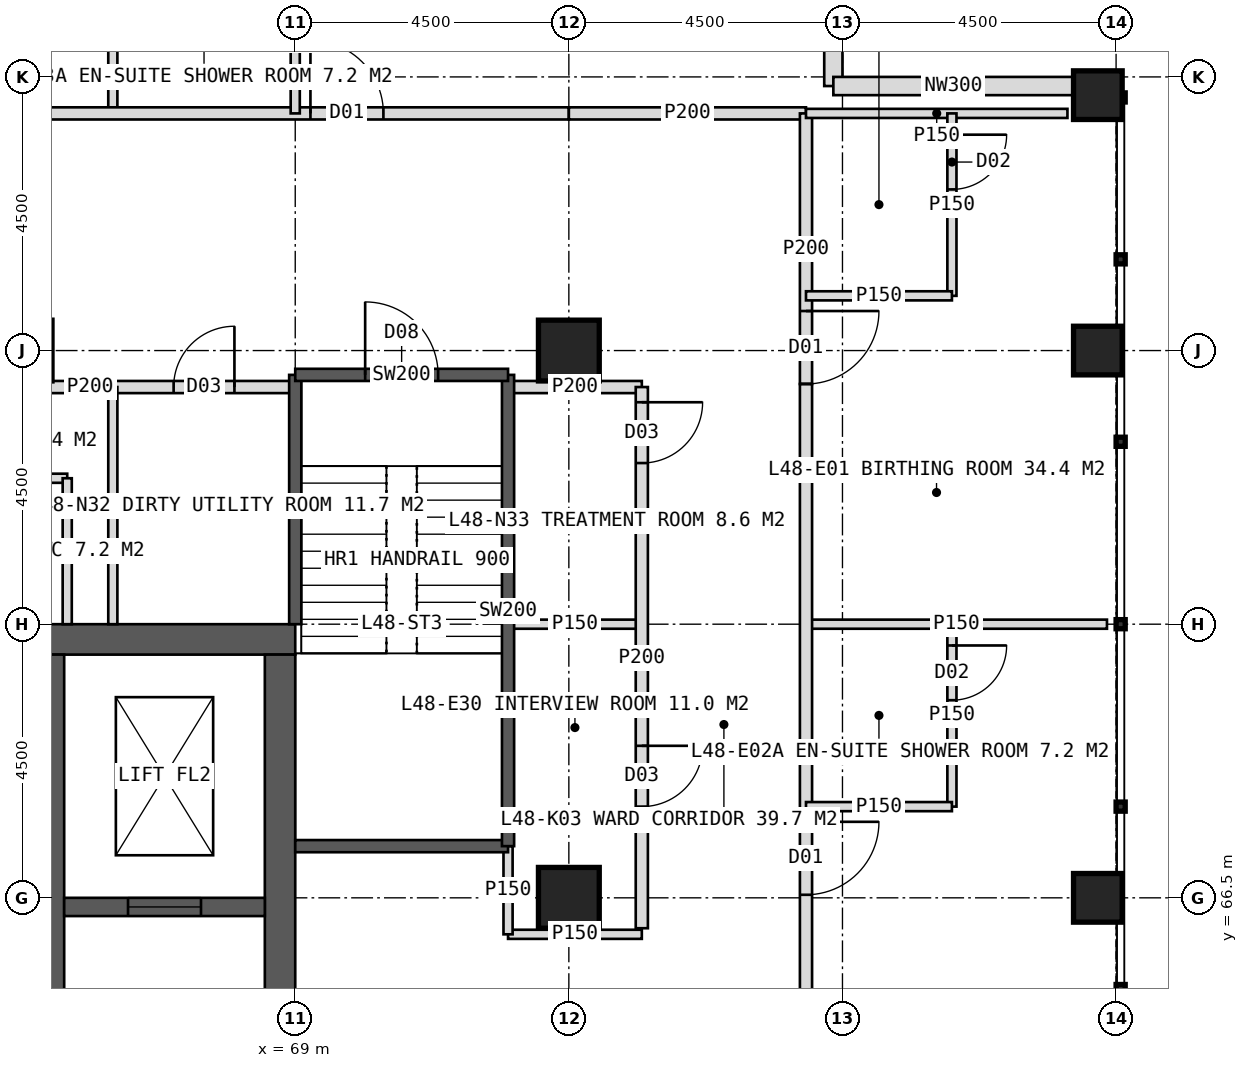
"""IFC4 building model, lengths in metres.
Left out: names, types, materials, properties, quantities, classifications, styles, units other than length and angle.
Written with IfcOpenShell. Run it as: python <this file> out.ifc"""

import sys

from ifc_helpers import new_model, si_unit, direction, frame, frame_2d, origin, origin_2d, place, context, subcontext, project, spatial, rectangle, hollow_rectangle, extrude, element, fill, save


model = new_model("IFC4")
c1 = context("Model", 3, precision=1e-05, world=origin(), true_north=direction((0.0, 1.0)))
c2 = subcontext(c1, "Body", "Model", "MODEL_VIEW")
j1 = project(units=[si_unit("LENGTHUNIT", "METRE"), si_unit("PLANEANGLEUNIT", "RADIAN")], contexts=[c1])
p1 = place(None, origin())
s1 = spatial("IfcSite", under=j1, at=p1, CompositionType="ELEMENT")
p2 = place(p1, origin())
s2 = spatial("IfcBuilding", under=s1, at=p2, CompositionType="ELEMENT")
p3 = place(p2, frame((0.0, 0.0, 201.0)))
s3 = spatial("IfcBuildingStorey", under=s2, at=p3, CompositionType="ELEMENT", Elevation=201.0)
p4 = place(p3, frame((51.0, 70.75, 0.0), z_axis=(0.0, 0.0, 1.0), x_axis=(1.0, 0.0, 0.0)))
e1 = element("IfcWall", 1, at=p4, inside=s3, PredefinedType="SHEAR", context=c2, shape_type="SweptSolid", body=[
    extrude(rectangle(XDim=18.0, YDim=0.5, at=frame_2d((9.0, 0.0))), origin(), (0.0, 0.0, 1.0), 4.0),
])
p5 = place(p4, frame((8.1, 0.0, 0.0)))
e2 = element("IfcOpeningElement", 2, at=p5, cuts=e1, PredefinedType="OPENING", context=c2, shape_type="SweptSolid", body=[
    extrude(rectangle(XDim=1.8, YDim=2.2, at=frame_2d((0.9, 1.1))), frame((0.0, 0.26, 0.0), z_axis=(0.0, -1.0, 0.0), x_axis=(1.0, 0.0, 0.0)), (0.0, 0.0, 1.0), 0.52),
])
p6 = place(p3, frame((68.75, 53.5, 0.0), z_axis=(0.0, 0.0, 1.0), x_axis=(0.0, 1.0, 0.0)))
e3 = element("IfcWall", 3, at=p6, inside=s3, PredefinedType="SHEAR", context=c2, shape_type="SweptSolid", body=[
    extrude(rectangle(XDim=17.0, YDim=0.5, at=frame_2d((8.5, 0.0))), origin(), (0.0, 0.0, 1.0), 4.0),
])
p7 = place(p6, frame((9.6, 0.0, 0.0)))
e4 = element("IfcOpeningElement", 4, at=p7, cuts=e3, PredefinedType="OPENING", context=c2, shape_type="SweptSolid", body=[
    extrude(rectangle(XDim=1.5, YDim=2.2, at=frame_2d((0.75, 1.1))), frame((0.0, 0.26, 0.0), z_axis=(0.0, -1.0, 0.0), x_axis=(1.0, 0.0, 0.0)), (0.0, 0.0, 1.0), 0.52),
])
p8 = place(p3, frame((65.05, 53.5, 0.0), z_axis=(0.0, 0.0, 1.0), x_axis=(0.0, 1.0, 0.0)))
e5 = element("IfcWall", 5, at=p8, inside=s3, PredefinedType="SHEAR", context=c2, shape_type="SweptSolid", body=[
    extrude(rectangle(XDim=17.0, YDim=0.3, at=frame_2d((8.5, 0.0))), origin(), (0.0, 0.0, 1.0), 4.0),
])
p9 = place(p3, frame((65.2, 66.35, 0.0), z_axis=(0.0, 0.0, 1.0), x_axis=(1.0, 0.0, 0.0)))
e6 = element("IfcWall", 6, at=p9, inside=s3, PredefinedType="SHEAR", context=c2, shape_type="SweptSolid", body=[
    extrude(rectangle(XDim=3.3, YDim=0.3, at=frame_2d((1.65, 0.0))), origin(), (0.0, 0.0, 1.0), 4.0),
])
p10 = place(p9, frame((1.05, 0.0, 0.0)))
e7 = element("IfcOpeningElement", 7, at=p10, cuts=e6, PredefinedType="OPENING", context=c2, shape_type="SweptSolid", body=[
    extrude(rectangle(XDim=1.2, YDim=2.2, at=frame_2d((0.6, 1.1))), frame((0.0, 0.16, 0.0), z_axis=(0.0, -1.0, 0.0), x_axis=(1.0, 0.0, 0.0)), (0.0, 0.0, 1.0), 0.32),
])
for number, where, z_axis, x_axis in (
    (8, (73.5, 75.5, 0.0), (0.0, 0.0, 1.0), (1.0, 0.0, 0.0)),
    (9, (73.5, 66.5, 0.0), (0.0, 0.0, 1.0), (1.0, 0.0, 0.0)),
):
    element("IfcColumn", number, at=place(p3, frame(where, z_axis=z_axis, x_axis=x_axis)), inside=s3, PredefinedType="COLUMN", context=c2, shape_type="SweptSolid", body=[
        extrude(hollow_rectangle(XDim=1.0, YDim=1.0, WallThickness=0.1, at=origin_2d()), origin(), (0.0, 0.0, 1.0), 4.0),
    ])
for number, where, z_axis, x_axis in (
    (10, (82.2, 66.5, 0.0), (0.0, 0.0, 1.0), (1.0, 0.0, 0.0)),
    (11, (82.2, 75.5, 0.0), (0.0, 0.0, 1.0), (1.0, 0.0, 0.0)),
    (12, (82.2, 79.7, 0.0), (0.0, 0.0, 1.0), (1.0, 0.0, 0.0)),
):
    element("IfcColumn", number, at=place(p3, frame(where, z_axis=z_axis, x_axis=x_axis)), inside=s3, PredefinedType="COLUMN", context=c2, shape_type="SweptSolid", body=[
        extrude(hollow_rectangle(XDim=0.8, YDim=0.8, WallThickness=0.08, at=origin_2d()), origin(), (0.0, 0.0, 1.0), 4.0),
    ])
for number, where, z_axis, x_axis in (
    (13, (77.85, 83.8, 0.0), (0.0, 0.0, 1.0), (0.0, -1.0, 0.0)),
    (14, (77.85, 79.85, 0.0), (0.0, 0.0, 1.0), (1.0, 0.0, 0.0)),
):
    element("IfcWall", number, at=place(p3, frame(where, z_axis=z_axis, x_axis=x_axis)), inside=s3, PredefinedType="ELEMENTEDWALL", context=c2, shape_type="SweptSolid", body=[
        extrude(rectangle(XDim=3.95, YDim=0.3, at=frame_2d((1.975, 0.0))), origin(), (0.0, 0.0, 1.0), 2.85),
    ])
p11 = place(p3, frame((66.0, 79.4, 0.0), z_axis=(0.0, 0.0, 1.0), x_axis=(0.0, 1.0, 0.0)))
e15 = element("IfcWall", 15, at=p11, inside=s3, PredefinedType="PARTITIONING", context=c2, shape_type="SweptSolid", body=[
    extrude(rectangle(XDim=4.95, YDim=0.15, at=frame_2d((2.475, 0.0))), origin(), (0.0, 0.0, 1.0), 3.75),
])
p12 = place(p3, frame((47.05, 79.4, 0.0), z_axis=(0.0, 0.0, 1.0), x_axis=(1.0, 0.0, 0.0)))
e16 = element("IfcWall", 16, at=p12, inside=s3, PredefinedType="PARTITIONING", context=c2, shape_type="SweptSolid", body=[
    extrude(rectangle(XDim=26.45, YDim=0.2, at=frame_2d((13.225, 0.0))), origin(), (0.0, 0.0, 1.0), 3.75),
])
p13 = place(p12, frame((12.45, 0.0, 0.0)))
e17 = element("IfcOpeningElement", 17, at=p13, cuts=e16, PredefinedType="OPENING", context=c2, shape_type="SweptSolid", body=[
    extrude(rectangle(XDim=1.0, YDim=2.1, at=frame_2d((0.5, 1.05))), frame((0.0, 0.11, 0.0), z_axis=(0.0, -1.0, 0.0), x_axis=(1.0, 0.0, 0.0)), (0.0, 0.0, 1.0), 0.22),
])
p14 = place(p12, frame((22.2, 0.0, 0.0)))
e18 = element("IfcOpeningElement", 18, at=p14, cuts=e16, PredefinedType="OPENING", context=c2, shape_type="SweptSolid", body=[
    extrude(rectangle(XDim=1.2, YDim=2.2, at=frame_2d((0.6, 1.1))), frame((0.0, 0.11, 0.0), z_axis=(0.0, -1.0, 0.0), x_axis=(1.0, 0.0, 0.0)), (0.0, 0.0, 1.0), 0.22),
])
p15 = place(p3, frame((73.5, 79.4, 0.0), z_axis=(0.0, 0.0, 1.0), x_axis=(1.0, 0.0, 0.0)))
e19 = element("IfcWall", 19, at=p15, inside=s3, PredefinedType="PARTITIONING", context=c2, shape_type="SweptSolid", body=[
    extrude(rectangle(XDim=3.9, YDim=0.2, at=frame_2d((1.95, 0.0))), origin(), (0.0, 0.0, 1.0), 2.85),
])
p16 = place(p3, frame((69.0, 79.4, 0.0), z_axis=(0.0, 0.0, 1.0), x_axis=(0.0, 1.0, 0.0)))
e20 = element("IfcWall", 20, at=p16, inside=s3, PredefinedType="PARTITIONING", context=c2, shape_type="SweptSolid", body=[
    extrude(rectangle(XDim=2.4, YDim=0.15, at=frame_2d((1.2, 0.0))), origin(), (0.0, 0.0, 1.0), 3.75),
])
p17 = place(p3, frame((62.25, 74.9, 0.0), z_axis=(0.0, 0.0, 1.0), x_axis=(1.0, 0.0, 0.0)))
e21 = element("IfcWall", 21, at=p17, inside=s3, PredefinedType="PARTITIONING", context=c2, shape_type="SweptSolid", body=[
    extrude(rectangle(XDim=6.75, YDim=0.2, at=frame_2d((3.375, 0.0))), origin(), (0.0, 0.0, 1.0), 3.75),
])
p18 = place(p17, frame((0.325, 0.0, 0.0)))
e22 = element("IfcOpeningElement", 22, at=p18, cuts=e21, PredefinedType="OPENING", context=c2, shape_type="SweptSolid", body=[
    extrude(rectangle(XDim=1.0, YDim=2.1, at=frame_2d((0.5, 1.05))), frame((0.0, 0.11, 0.0), z_axis=(0.0, -1.0, 0.0), x_axis=(1.0, 0.0, 0.0)), (0.0, 0.0, 1.0), 0.22),
])
p19 = place(p17, frame((4.75, 0.0, 0.0)))
e23 = element("IfcOpeningElement", 23, at=p19, cuts=e21, PredefinedType="OPENING", context=c2, shape_type="SweptSolid", body=[
    extrude(rectangle(XDim=1.0, YDim=2.1, at=frame_2d((0.5, 1.05))), frame((0.0, 0.11, 0.0), z_axis=(0.0, -1.0, 0.0), x_axis=(1.0, 0.0, 0.0)), (0.0, 0.0, 1.0), 0.22),
])
p20 = place(p3, frame((72.5, 74.9, 0.0), z_axis=(0.0, 0.0, 1.0), x_axis=(1.0, 0.0, 0.0)))
e24 = element("IfcWall", 24, at=p20, inside=s3, PredefinedType="PARTITIONING", context=c2, shape_type="SweptSolid", body=[
    extrude(rectangle(XDim=2.2, YDim=0.2, at=frame_2d((1.1, 0.0))), origin(), (0.0, 0.0, 1.0), 3.75),
])
p21 = place(p3, frame((66.0, 71.0, 0.0), z_axis=(0.0, 0.0, 1.0), x_axis=(0.0, 1.0, 0.0)))
e25 = element("IfcWall", 25, at=p21, inside=s3, PredefinedType="PARTITIONING", context=c2, shape_type="SweptSolid", body=[
    extrude(rectangle(XDim=3.9, YDim=0.15, at=frame_2d((1.95, 0.0))), origin(), (0.0, 0.0, 1.0), 3.75),
])
p22 = place(p3, frame((62.25, 73.4, 0.0), z_axis=(0.0, 0.0, 1.0), x_axis=(1.0, 0.0, 0.0)))
e26 = element("IfcWall", 26, at=p22, inside=s3, PredefinedType="PARTITIONING", context=c2, shape_type="SweptSolid", body=[
    extrude(rectangle(XDim=3.0, YDim=0.15, at=frame_2d((1.5, 0.0))), origin(), (0.0, 0.0, 1.0), 3.75),
])
p23 = place(p3, frame((65.25, 71.0, 0.0), z_axis=(0.0, 0.0, 1.0), x_axis=(0.0, 1.0, 0.0)))
e27 = element("IfcWall", 27, at=p23, inside=s3, PredefinedType="PARTITIONING", context=c2, shape_type="SweptSolid", body=[
    extrude(rectangle(XDim=2.4, YDim=0.15, at=frame_2d((1.2, 0.0))), origin(), (0.0, 0.0, 1.0), 3.75),
])
p24 = place(p3, frame((77.4, 71.0, 0.0), z_axis=(0.0, 0.0, 1.0), x_axis=(1.0, 0.0, 0.0)))
e28 = element("IfcWall", 28, at=p24, inside=s3, PredefinedType="PARTITIONING", context=c2, shape_type="SweptSolid", body=[
    extrude(rectangle(XDim=4.95, YDim=0.15, at=frame_2d((2.475, 0.0))), origin(), (0.0, 0.0, 1.0), 3.75),
])
p25 = place(p3, frame((77.4, 79.4, 0.0), z_axis=(0.0, 0.0, 1.0), x_axis=(0.0, -1.0, 0.0)))
e29 = element("IfcWall", 29, at=p25, inside=s3, PredefinedType="PARTITIONING", context=c2, shape_type="SweptSolid", body=[
    extrude(rectangle(XDim=4.45, YDim=0.2, at=frame_2d((2.225, 0.0))), origin(), (0.0, 0.0, 1.0), 2.85),
])
p26 = place(p25, frame((3.25, 0.0, 0.0)))
e30 = element("IfcOpeningElement", 30, at=p26, cuts=e29, PredefinedType="OPENING", context=c2, shape_type="SweptSolid", body=[
    extrude(rectangle(XDim=1.2, YDim=2.2, at=frame_2d((0.6, 1.1))), frame((0.0, 0.11, 0.0), z_axis=(0.0, -1.0, 0.0), x_axis=(1.0, 0.0, 0.0)), (0.0, 0.0, 1.0), 0.22),
])
p27 = place(p3, frame((77.4, 74.95, 0.0), z_axis=(0.0, 0.0, 1.0), x_axis=(0.0, -1.0, 0.0)))
e31 = element("IfcWall", 31, at=p27, inside=s3, PredefinedType="PARTITIONING", context=c2, shape_type="SweptSolid", body=[
    extrude(rectangle(XDim=26.45, YDim=0.2, at=frame_2d((13.225, 0.0))), origin(), (0.0, 0.0, 1.0), 3.75),
])
p28 = place(p27, frame((7.2, 0.0, 0.0)))
e32 = element("IfcOpeningElement", 32, at=p28, cuts=e31, PredefinedType="OPENING", context=c2, shape_type="SweptSolid", body=[
    extrude(rectangle(XDim=1.2, YDim=2.2, at=frame_2d((0.6, 1.1))), frame((0.0, 0.11, 0.0), z_axis=(0.0, -1.0, 0.0), x_axis=(1.0, 0.0, 0.0)), (0.0, 0.0, 1.0), 0.22),
])
p29 = place(p27, frame((16.2, 0.0, 0.0)))
e33 = element("IfcOpeningElement", 33, at=p29, cuts=e31, PredefinedType="OPENING", context=c2, shape_type="SweptSolid", body=[
    extrude(rectangle(XDim=1.2, YDim=2.2, at=frame_2d((0.6, 1.1))), frame((0.0, 0.11, 0.0), z_axis=(0.0, -1.0, 0.0), x_axis=(1.0, 0.0, 0.0)), (0.0, 0.0, 1.0), 0.22),
])
p30 = place(p27, frame((25.2, 0.0, 0.0)))
e34 = element("IfcOpeningElement", 34, at=p30, cuts=e31, PredefinedType="OPENING", context=c2, shape_type="SweptSolid", body=[
    extrude(rectangle(XDim=1.2, YDim=2.2, at=frame_2d((0.6, 1.1))), frame((0.0, 0.11, 0.0), z_axis=(0.0, -1.0, 0.0), x_axis=(1.0, 0.0, 0.0)), (0.0, 0.0, 1.0), 0.22),
])
p31 = place(p3, frame((77.4, 79.4, 0.0), z_axis=(0.0, 0.0, 1.0), x_axis=(1.0, 0.0, 0.0)))
e35 = element("IfcWall", 35, at=p31, inside=s3, PredefinedType="PARTITIONING", context=c2, shape_type="SweptSolid", body=[
    extrude(rectangle(XDim=4.3, YDim=0.15, at=frame_2d((2.15, 0.0))), origin(), (0.0, 0.0, 1.0), 2.85),
])
p32 = place(p3, frame((79.8, 79.4, 0.0), z_axis=(0.0, 0.0, 1.0), x_axis=(0.0, -1.0, 0.0)))
e36 = element("IfcWall", 36, at=p32, inside=s3, PredefinedType="PARTITIONING", context=c2, shape_type="SweptSolid", body=[
    extrude(rectangle(XDim=3.0, YDim=0.15, at=frame_2d((1.5, 0.0))), origin(), (0.0, 0.0, 1.0), 3.75),
])
p33 = place(p32, frame((0.35, 0.0, 0.0)))
e37 = element("IfcOpeningElement", 37, at=p33, cuts=e36, PredefinedType="OPENING", context=c2, shape_type="SweptSolid", body=[
    extrude(rectangle(XDim=0.9, YDim=2.1, at=frame_2d((0.45, 1.05))), frame((0.0, 0.085, 0.0), z_axis=(0.0, -1.0, 0.0), x_axis=(1.0, 0.0, 0.0)), (0.0, 0.0, 1.0), 0.17),
])
p34 = place(p3, frame((77.4, 76.4, 0.0), z_axis=(0.0, 0.0, 1.0), x_axis=(1.0, 0.0, 0.0)))
e38 = element("IfcWall", 38, at=p34, inside=s3, PredefinedType="PARTITIONING", context=c2, shape_type="SweptSolid", body=[
    extrude(rectangle(XDim=2.4, YDim=0.15, at=frame_2d((1.2, 0.0))), origin(), (0.0, 0.0, 1.0), 3.75),
])
p35 = place(p3, frame((79.8, 71.0, 0.0), z_axis=(0.0, 0.0, 1.0), x_axis=(0.0, -1.0, 0.0)))
e39 = element("IfcWall", 39, at=p35, inside=s3, PredefinedType="PARTITIONING", context=c2, shape_type="SweptSolid", body=[
    extrude(rectangle(XDim=3.0, YDim=0.15, at=frame_2d((1.5, 0.0))), origin(), (0.0, 0.0, 1.0), 3.75),
])
p36 = place(p35, frame((0.35, 0.0, 0.0)))
e40 = element("IfcOpeningElement", 40, at=p36, cuts=e39, PredefinedType="OPENING", context=c2, shape_type="SweptSolid", body=[
    extrude(rectangle(XDim=0.9, YDim=2.1, at=frame_2d((0.45, 1.05))), frame((0.0, 0.085, 0.0), z_axis=(0.0, -1.0, 0.0), x_axis=(1.0, 0.0, 0.0)), (0.0, 0.0, 1.0), 0.17),
])
p37 = place(p3, frame((77.4, 68.0, 0.0), z_axis=(0.0, 0.0, 1.0), x_axis=(1.0, 0.0, 0.0)))
e41 = element("IfcWall", 41, at=p37, inside=s3, PredefinedType="PARTITIONING", context=c2, shape_type="SweptSolid", body=[
    extrude(rectangle(XDim=2.4, YDim=0.15, at=frame_2d((1.2, 0.0))), origin(), (0.0, 0.0, 1.0), 3.75),
])
p38 = place(p3, frame((72.5, 71.0, 0.0), z_axis=(0.0, 0.0, 1.0), x_axis=(1.0, 0.0, 0.0)))
e42 = element("IfcWall", 42, at=p38, inside=s3, PredefinedType="PARTITIONING", context=c2, shape_type="SweptSolid", body=[
    extrude(rectangle(XDim=2.2, YDim=0.15, at=frame_2d((1.1, 0.0))), origin(), (0.0, 0.0, 1.0), 3.75),
])
p39 = place(p3, frame((74.7, 74.9, 0.0), z_axis=(0.0, 0.0, 1.0), x_axis=(0.0, -1.0, 0.0)))
e43 = element("IfcWall", 43, at=p39, inside=s3, PredefinedType="PARTITIONING", context=c2, shape_type="SweptSolid", body=[
    extrude(rectangle(XDim=8.9, YDim=0.2, at=frame_2d((4.45, 0.0))), origin(), (0.0, 0.0, 1.0), 3.75),
])
p40 = place(p39, frame((0.25, 0.0, 0.0)))
e44 = element("IfcOpeningElement", 44, at=p40, cuts=e43, PredefinedType="OPENING", context=c2, shape_type="SweptSolid", body=[
    extrude(rectangle(XDim=1.0, YDim=2.1, at=frame_2d((0.5, 1.05))), frame((0.0, 0.11, 0.0), z_axis=(0.0, -1.0, 0.0), x_axis=(1.0, 0.0, 0.0)), (0.0, 0.0, 1.0), 0.22),
])
p41 = place(p39, frame((5.9, 0.0, 0.0)))
e45 = element("IfcOpeningElement", 45, at=p41, cuts=e43, PredefinedType="OPENING", context=c2, shape_type="SweptSolid", body=[
    extrude(rectangle(XDim=1.0, YDim=2.1, at=frame_2d((0.5, 1.05))), frame((0.0, 0.11, 0.0), z_axis=(0.0, -1.0, 0.0), x_axis=(1.0, 0.0, 0.0)), (0.0, 0.0, 1.0), 0.22),
])
p42 = place(p3, frame((72.5, 65.9, 0.0), z_axis=(0.0, 0.0, 1.0), x_axis=(1.0, 0.0, 0.0)))
e46 = element("IfcWall", 46, at=p42, inside=s3, PredefinedType="PARTITIONING", context=c2, shape_type="SweptSolid", body=[
    extrude(rectangle(XDim=2.2, YDim=0.15, at=frame_2d((1.1, 0.0))), origin(), (0.0, 0.0, 1.0), 3.75),
])
p43 = place(p3, frame((72.5, 65.9, 0.0), z_axis=(0.0, 0.0, 1.0), x_axis=(0.0, 1.0, 0.0)))
e47 = element("IfcWall", 47, at=p43, inside=s3, PredefinedType="PARTITIONING", context=c2, shape_type="SweptSolid", body=[
    extrude(rectangle(XDim=1.45, YDim=0.15, at=frame_2d((0.725, 0.0))), origin(), (0.0, 0.0, 1.0), 3.75),
])
p44 = place(p3, frame((69.0, 71.0, 0.0), z_axis=(0.0, 0.0, 1.0), x_axis=(0.0, 1.0, 0.0)))
e48 = element("IfcWall", 48, at=p44, inside=s3, PredefinedType="SOLIDWALL", context=c2, shape_type="SweptSolid", body=[
    extrude(rectangle(XDim=4.1, YDim=0.2, at=frame_2d((2.05, 0.0))), origin(), (0.0, 0.0, 1.0), 3.75),
])
p45 = place(p3, frame((69.0, 67.35, 0.0), z_axis=(0.0, 0.0, 1.0), x_axis=(1.0, 0.0, 0.0)))
e49 = element("IfcWall", 49, at=p45, inside=s3, PredefinedType="SOLIDWALL", context=c2, shape_type="SweptSolid", body=[
    extrude(rectangle(XDim=3.5, YDim=0.2, at=frame_2d((1.75, 0.0))), origin(), (0.0, 0.0, 1.0), 3.75),
])
p46 = place(p3, frame((72.5, 67.35, 0.0), z_axis=(0.0, 0.0, 1.0), x_axis=(0.0, 1.0, 0.0)))
e50 = element("IfcWall", 50, at=p46, inside=s3, PredefinedType="SOLIDWALL", context=c2, shape_type="SweptSolid", body=[
    extrude(rectangle(XDim=7.75, YDim=0.2, at=frame_2d((3.875, 0.0))), origin(), (0.0, 0.0, 1.0), 3.75),
])
p47 = place(p3, frame((69.0, 75.1, 0.0), z_axis=(0.0, 0.0, 1.0), x_axis=(1.0, 0.0, 0.0)))
e51 = element("IfcWall", 51, at=p47, inside=s3, PredefinedType="SOLIDWALL", context=c2, shape_type="SweptSolid", body=[
    extrude(rectangle(XDim=3.5, YDim=0.2, at=frame_2d((1.75, 0.0))), origin(), (0.0, 0.0, 1.0), 3.75),
])
p48 = place(p47, frame((1.15, 0.0, 0.0)))
e52 = element("IfcOpeningElement", 52, at=p48, cuts=e51, PredefinedType="OPENING", context=c2, shape_type="SweptSolid", body=[
    extrude(rectangle(XDim=1.2, YDim=2.1, at=frame_2d((0.6, 1.05))), frame((0.0, 0.11, 0.0), z_axis=(0.0, -1.0, 0.0), x_axis=(1.0, 0.0, 0.0)), (0.0, 0.0, 1.0), 0.22),
])
p49 = place(p14, origin())
e53 = element("IfcDoor", 53, at=p49, inside=s3, OperationType="SINGLE_SWING_LEFT", PredefinedType="DOOR", context=c2, shape_type="SweptSolid", body=[
    extrude(rectangle(XDim=1.2, YDim=2.2, at=frame_2d((0.6, 1.1))), frame((0.0, 0.025, 0.0), z_axis=(0.0, -1.0, 0.0), x_axis=(1.0, 0.0, 0.0)), (0.0, 0.0, 1.0), 0.05),
])
fill(e18, e53)
p50 = place(p19, origin())
e54 = element("IfcDoor", 54, at=p50, inside=s3, OperationType="SINGLE_SWING_RIGHT", PredefinedType="DOOR", context=c2, shape_type="SweptSolid", body=[
    extrude(rectangle(XDim=1.0, YDim=2.1, at=frame_2d((0.5, 1.05))), frame((0.0, 0.025, 0.0), z_axis=(0.0, -1.0, 0.0), x_axis=(1.0, 0.0, 0.0)), (0.0, 0.0, 1.0), 0.05),
])
fill(e23, e54)
p51 = place(p40, origin())
e55 = element("IfcDoor", 55, at=p51, inside=s3, OperationType="SINGLE_SWING_LEFT", PredefinedType="DOOR", context=c2, shape_type="SweptSolid", body=[
    extrude(rectangle(XDim=1.0, YDim=2.1, at=frame_2d((0.5, 1.05))), frame((0.0, 0.025, 0.0), z_axis=(0.0, -1.0, 0.0), x_axis=(1.0, 0.0, 0.0)), (0.0, 0.0, 1.0), 0.05),
])
fill(e44, e55)
p52 = place(p26, origin())
e56 = element("IfcDoor", 56, at=p52, inside=s3, OperationType="SINGLE_SWING_LEFT", PredefinedType="DOOR", context=c2, shape_type="SweptSolid", body=[
    extrude(rectangle(XDim=1.2, YDim=2.2, at=frame_2d((0.6, 1.1))), frame((0.0, 0.025, 0.0), z_axis=(0.0, -1.0, 0.0), x_axis=(1.0, 0.0, 0.0)), (0.0, 0.0, 1.0), 0.05),
])
fill(e30, e56)
p53 = place(p33, origin())
e57 = element("IfcDoor", 57, at=p53, inside=s3, OperationType="SINGLE_SWING_LEFT", PredefinedType="DOOR", context=c2, shape_type="SweptSolid", body=[
    extrude(rectangle(XDim=0.9, YDim=2.1, at=frame_2d((0.45, 1.05))), frame((0.0, 0.025, 0.0), z_axis=(0.0, -1.0, 0.0), x_axis=(1.0, 0.0, 0.0)), (0.0, 0.0, 1.0), 0.05),
])
fill(e37, e57)
p54 = place(p28, origin())
e58 = element("IfcDoor", 58, at=p54, inside=s3, OperationType="SINGLE_SWING_LEFT", PredefinedType="DOOR", context=c2, shape_type="SweptSolid", body=[
    extrude(rectangle(XDim=1.2, YDim=2.2, at=frame_2d((0.6, 1.1))), frame((0.0, 0.025, 0.0), z_axis=(0.0, -1.0, 0.0), x_axis=(1.0, 0.0, 0.0)), (0.0, 0.0, 1.0), 0.05),
])
fill(e32, e58)
p55 = place(p36, origin())
e59 = element("IfcDoor", 59, at=p55, inside=s3, OperationType="SINGLE_SWING_LEFT", PredefinedType="DOOR", context=c2, shape_type="SweptSolid", body=[
    extrude(rectangle(XDim=0.9, YDim=2.1, at=frame_2d((0.45, 1.05))), frame((0.0, 0.025, 0.0), z_axis=(0.0, -1.0, 0.0), x_axis=(1.0, 0.0, 0.0)), (0.0, 0.0, 1.0), 0.05),
])
fill(e40, e59)
p56 = place(p41, origin())
e60 = element("IfcDoor", 60, at=p56, inside=s3, OperationType="SINGLE_SWING_LEFT", PredefinedType="DOOR", context=c2, shape_type="SweptSolid", body=[
    extrude(rectangle(XDim=1.0, YDim=2.1, at=frame_2d((0.5, 1.05))), frame((0.0, 0.025, 0.0), z_axis=(0.0, -1.0, 0.0), x_axis=(1.0, 0.0, 0.0)), (0.0, 0.0, 1.0), 0.05),
])
fill(e45, e60)
p57 = place(p10, origin())
e61 = element("IfcDoor", 61, at=p57, inside=s3, OperationType="SLIDING_TO_LEFT", PredefinedType="DOOR", context=c2, shape_type="SweptSolid", body=[
    extrude(rectangle(XDim=1.2, YDim=2.2, at=frame_2d((0.6, 1.1))), frame((0.0, 0.025, 0.0), z_axis=(0.0, -1.0, 0.0), x_axis=(1.0, 0.0, 0.0)), (0.0, 0.0, 1.0), 0.05),
])
fill(e7, e61)
p58 = place(p48, origin())
e62 = element("IfcDoor", 62, at=p58, inside=s3, OperationType="SINGLE_SWING_LEFT", PredefinedType="DOOR", context=c2, shape_type="SweptSolid", body=[
    extrude(rectangle(XDim=1.2, YDim=2.1, at=frame_2d((0.6, 1.05))), frame((0.0, 0.025, 0.0), z_axis=(0.0, -1.0, 0.0), x_axis=(1.0, 0.0, 0.0)), (0.0, 0.0, 1.0), 0.05),
])
fill(e52, e62)
save(model, sys.argv[1])
